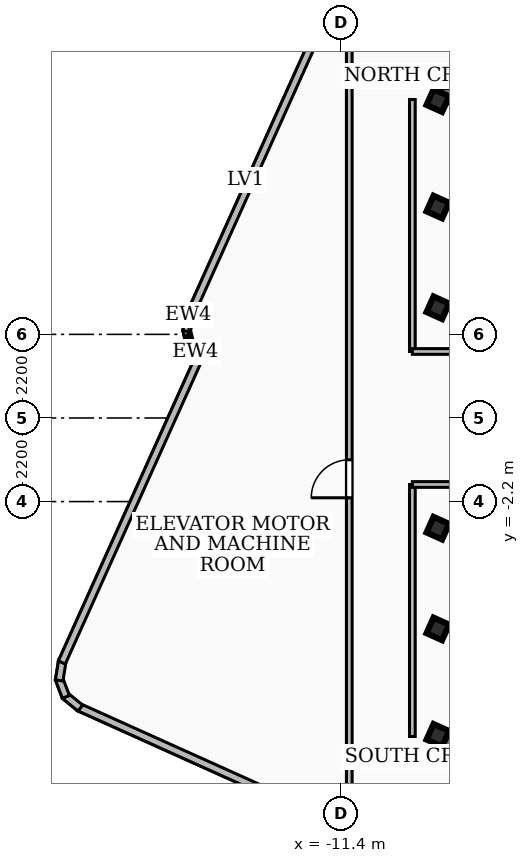
"""IFC4 building model, lengths in metres.
Left out: names, types, materials, properties, quantities, classifications, styles, units other than length and angle.
Written with IfcOpenShell. Run it as: python <this file> out.ifc"""

import sys

from ifc_helpers import new_model, si_unit, direction, frame, frame_2d, origin, origin_2d, place, context, subcontext, project, spatial, rectangle, hollow_rectangle, extrude, element, fill, save


model = new_model("IFC4")
c1 = context("Model", 3, precision=1e-05, world=origin(), true_north=direction((0.0, 1.0)))
c2 = subcontext(c1, "Body", "Model", "MODEL_VIEW")
j1 = project(units=[si_unit("LENGTHUNIT", "METRE"), si_unit("PLANEANGLEUNIT", "RADIAN")], contexts=[c1])
p1 = place(None, origin())
s1 = spatial("IfcSite", under=j1, at=p1, CompositionType="ELEMENT")
p2 = place(p1, origin())
s2 = spatial("IfcBuilding", under=s1, at=p2, CompositionType="ELEMENT")
p3 = place(p2, frame((0.0, 0.0, 297.54)))
s3 = spatial("IfcBuildingStorey", under=s2, at=p3, CompositionType="ELEMENT", Elevation=297.54)
for number, where, z_axis, x_axis in (
    (1, (-8.78, 8.51, 0.0), (0.0, 0.0, 1.0), (1.0, 0.0, 0.0)),
    (2, (8.78, -8.51, 0.0), (0.0, 0.0, 1.0), (-1.0, 0.0, 0.0)),
):
    element("IfcWall", number, at=place(p3, frame(where, z_axis=z_axis, x_axis=x_axis)), inside=s3, PredefinedType="SHEAR", context=c2, shape_type="SweptSolid", body=[
        extrude(rectangle(XDim=17.56, YDim=0.4, at=frame_2d((8.78, 0.0))), origin(), (0.0, 0.0, 1.0), 3.84),
    ])
for number, where, z_axis, x_axis in (
    (3, (-8.85, -5.55, 0.0), (0.0, 0.0, 1.0), (0.411, 0.912, 0.0)),
    (4, (-8.85, -2.9, 0.0), (0.0, 0.0, 1.0), (0.411, 0.912, 0.0)),
    (5, (-8.85, 2.9, 0.0), (0.0, 0.0, 1.0), (0.411, 0.912, 0.0)),
    (6, (-8.85, 5.55, 0.0), (0.0, 0.0, 1.0), (0.411, 0.912, 0.0)),
    (7, (-8.85, 8.35, 0.0), (0.0, 0.0, 1.0), (0.411, 0.912, 0.0)),
    (8, (-8.85, -8.35, 0.0), (0.0, 0.0, 1.0), (0.411, 0.912, 0.0)),
):
    element("IfcColumn", number, at=place(p3, frame(where, z_axis=z_axis, x_axis=x_axis)), inside=s3, PredefinedType="COLUMN", context=c2, shape_type="SweptSolid", body=[
        extrude(hollow_rectangle(XDim=0.45, YDim=0.45, WallThickness=0.022, at=origin_2d()), origin(), (0.0, 0.0, 1.0), 4.14),
    ])
p4 = place(p3, frame((-15.071, 1.551, 0.0), z_axis=(0.0, 0.0, 1.0), x_axis=(-0.621271987863, 0.783594995579, 0.0)))
e9 = element("IfcWall", 9, at=p4, inside=s3, PredefinedType="SOLIDWALL", context=c2, shape_type="SweptSolid", body=[
    extrude(rectangle(XDim=0.505, YDim=0.2, at=frame_2d((0.253, 0.0))), origin(), (0.0, 0.0, 1.0), 3.84),
])
p5 = place(p3, frame((-15.363, 1.903, 0.0), z_axis=(0.0, 0.0, 1.0), x_axis=(-0.230841504765, 0.972991366703, 0.0)))
e10 = element("IfcWall", 10, at=p5, inside=s3, PredefinedType="SOLIDWALL", context=c2, shape_type="SweptSolid", body=[
    extrude(rectangle(XDim=0.438, YDim=0.2, at=frame_2d((0.219, 0.0))), origin(), (0.0, 0.0, 1.0), 3.84),
])
p6 = place(p3, frame((-15.463, 2.281, 0.0), z_axis=(0.0, 0.0, 1.0), x_axis=(0.202605604036, 0.979260419507, 0.0)))
e11 = element("IfcWall", 11, at=p6, inside=s3, PredefinedType="SOLIDWALL", context=c2, shape_type="SweptSolid", body=[
    extrude(rectangle(XDim=0.448, YDim=0.2, at=frame_2d((0.224, 0.0))), origin(), (0.0, 0.0, 1.0), 3.84),
])
p7 = place(p3, frame((-15.387, 2.673, 0.0), z_axis=(0.0, 0.0, 1.0), x_axis=(0.41050728393, 0.911857318795, 0.0)))
e12 = element("IfcWall", 12, at=p7, inside=s3, PredefinedType="SOLIDWALL", context=c2, shape_type="SweptSolid", body=[
    extrude(rectangle(XDim=7.759, YDim=0.2, at=frame_2d((3.879, 0.0))), origin(), (0.0, 0.0, 1.0), 3.84),
])
p8 = place(p3, frame((6.434, -18.744, 0.0), z_axis=(0.0, 0.0, 1.0), x_axis=(-0.911837784954, 0.410550671574, 0.0)))
e13 = element("IfcWall", 13, at=p8, inside=s3, PredefinedType="SOLIDWALL", context=c2, shape_type="SweptSolid", body=[
    extrude(rectangle(XDim=27.125, YDim=0.2, at=frame_2d((13.562, 0.0))), origin(), (0.0, 0.0, 1.0), 3.84),
])
p9 = place(p3, frame((-18.257, -7.634, 0.0), z_axis=(0.0, 0.0, 1.0), x_axis=(-0.773771583857, 0.63346470779, 0.0)))
e14 = element("IfcWall", 14, at=p9, inside=s3, PredefinedType="SOLIDWALL", context=c2, shape_type="SweptSolid", body=[
    extrude(rectangle(XDim=0.527, YDim=0.2, at=frame_2d((0.264, 0.0))), origin(), (0.0, 0.0, 1.0), 3.84),
])
p10 = place(p3, frame((-18.637, -7.339, 0.0), z_axis=(0.0, 0.0, 1.0), x_axis=(-0.354611244695, 0.935013831521, 0.0)))
e15 = element("IfcWall", 15, at=p10, inside=s3, PredefinedType="SOLIDWALL", context=c2, shape_type="SweptSolid", body=[
    extrude(rectangle(XDim=0.514, YDim=0.2, at=frame_2d((0.257, 0.0))), origin(), (0.0, 0.0, 1.0), 3.84),
])
p11 = place(p3, frame((-18.814, -6.907, 0.0), z_axis=(0.0, 0.0, 1.0), x_axis=(0.159145166984, 0.987255192858, 0.0)))
e16 = element("IfcWall", 16, at=p11, inside=s3, PredefinedType="SOLIDWALL", context=c2, shape_type="SweptSolid", body=[
    extrude(rectangle(XDim=0.528, YDim=0.2, at=frame_2d((0.264, 0.0))), origin(), (0.0, 0.0, 1.0), 3.84),
])
p12 = place(p3, frame((-18.744, -6.434, 0.0), z_axis=(0.0, 0.0, 1.0), x_axis=(0.410506010515, 0.911857892071, 0.0)))
e17 = element("IfcWall", 17, at=p12, inside=s3, PredefinedType="SOLIDWALL", context=c2, shape_type="SweptSolid", body=[
    extrude(rectangle(XDim=8.906, YDim=0.2, at=frame_2d((4.453, 0.0))), origin(), (0.0, 0.0, 1.0), 3.84),
])
p13 = place(p3, frame((-9.52, 1.75, 0.0), z_axis=(0.0, 0.0, 1.0), x_axis=(0.0, 1.0, 0.0)))
e18 = element("IfcWall", 18, at=p13, inside=s3, PredefinedType="PARTITIONING", context=c2, shape_type="SweptSolid", body=[
    extrude(rectangle(XDim=6.63, YDim=0.15, at=frame_2d((3.315, 0.0))), origin(), (0.0, 0.0, 1.0), 3.21),
])
p14 = place(p3, frame((-7.85, 1.75, 0.0), z_axis=(0.0, 0.0, 1.0), x_axis=(-1.0, 0.0, 0.0)))
e19 = element("IfcWall", 19, at=p14, inside=s3, PredefinedType="PARTITIONING", context=c2, shape_type="SweptSolid", body=[
    extrude(rectangle(XDim=1.67, YDim=0.15, at=frame_2d((0.835, 0.0))), origin(), (0.0, 0.0, 1.0), 3.07),
])
p15 = place(p3, frame((-9.52, -8.38, 0.0), z_axis=(0.0, 0.0, 1.0), x_axis=(0.0, 1.0, 0.0)))
e20 = element("IfcWall", 20, at=p15, inside=s3, PredefinedType="PARTITIONING", context=c2, shape_type="SweptSolid", body=[
    extrude(rectangle(XDim=6.63, YDim=0.15, at=frame_2d((3.315, 0.0))), origin(), (0.0, 0.0, 1.0), 3.84),
])
p16 = place(p3, frame((-7.85, -1.75, 0.0), z_axis=(0.0, 0.0, 1.0), x_axis=(-1.0, 0.0, 0.0)))
e21 = element("IfcWall", 21, at=p16, inside=s3, PredefinedType="PARTITIONING", context=c2, shape_type="SweptSolid", body=[
    extrude(rectangle(XDim=1.67, YDim=0.15, at=frame_2d((0.835, 0.0))), origin(), (0.0, 0.0, 1.0), 3.07),
])
p17 = place(p3, frame((-11.18, -10.742, 0.0), z_axis=(0.0, 0.0, 1.0), x_axis=(0.0, 1.0, 0.0)))
e22 = element("IfcWall", 22, at=p17, inside=s3, PredefinedType="PARTITIONING", context=c2, shape_type="SweptSolid", body=[
    extrude(rectangle(XDim=21.02, YDim=0.15, at=frame_2d((10.51, 0.0))), origin(), (0.0, 0.0, 1.0), 3.21),
])
p18 = place(p17, frame((8.642, 0.0, 0.0)))
e23 = element("IfcOpeningElement", 23, at=p18, cuts=e22, PredefinedType="OPENING", context=c2, shape_type="SweptSolid", body=[
    extrude(rectangle(XDim=1.0, YDim=2.1, at=frame_2d((0.5, 1.05))), frame((0.0, 0.085, 0.0), z_axis=(0.0, -1.0, 0.0), x_axis=(1.0, 0.0, 0.0)), (0.0, 0.0, 1.0), 0.17),
])
p19 = place(p18, origin())
e24 = element("IfcDoor", 24, at=p19, inside=s3, OperationType="SINGLE_SWING_LEFT", PredefinedType="DOOR", context=c2, shape_type="SweptSolid", body=[
    extrude(rectangle(XDim=1.0, YDim=2.1, at=frame_2d((0.5, 1.05))), frame((0.0, 0.025, 0.0), z_axis=(0.0, -1.0, 0.0), x_axis=(1.0, 0.0, 0.0)), (0.0, 0.0, 1.0), 0.05),
])
fill(e23, e24)
save(model, sys.argv[1])
